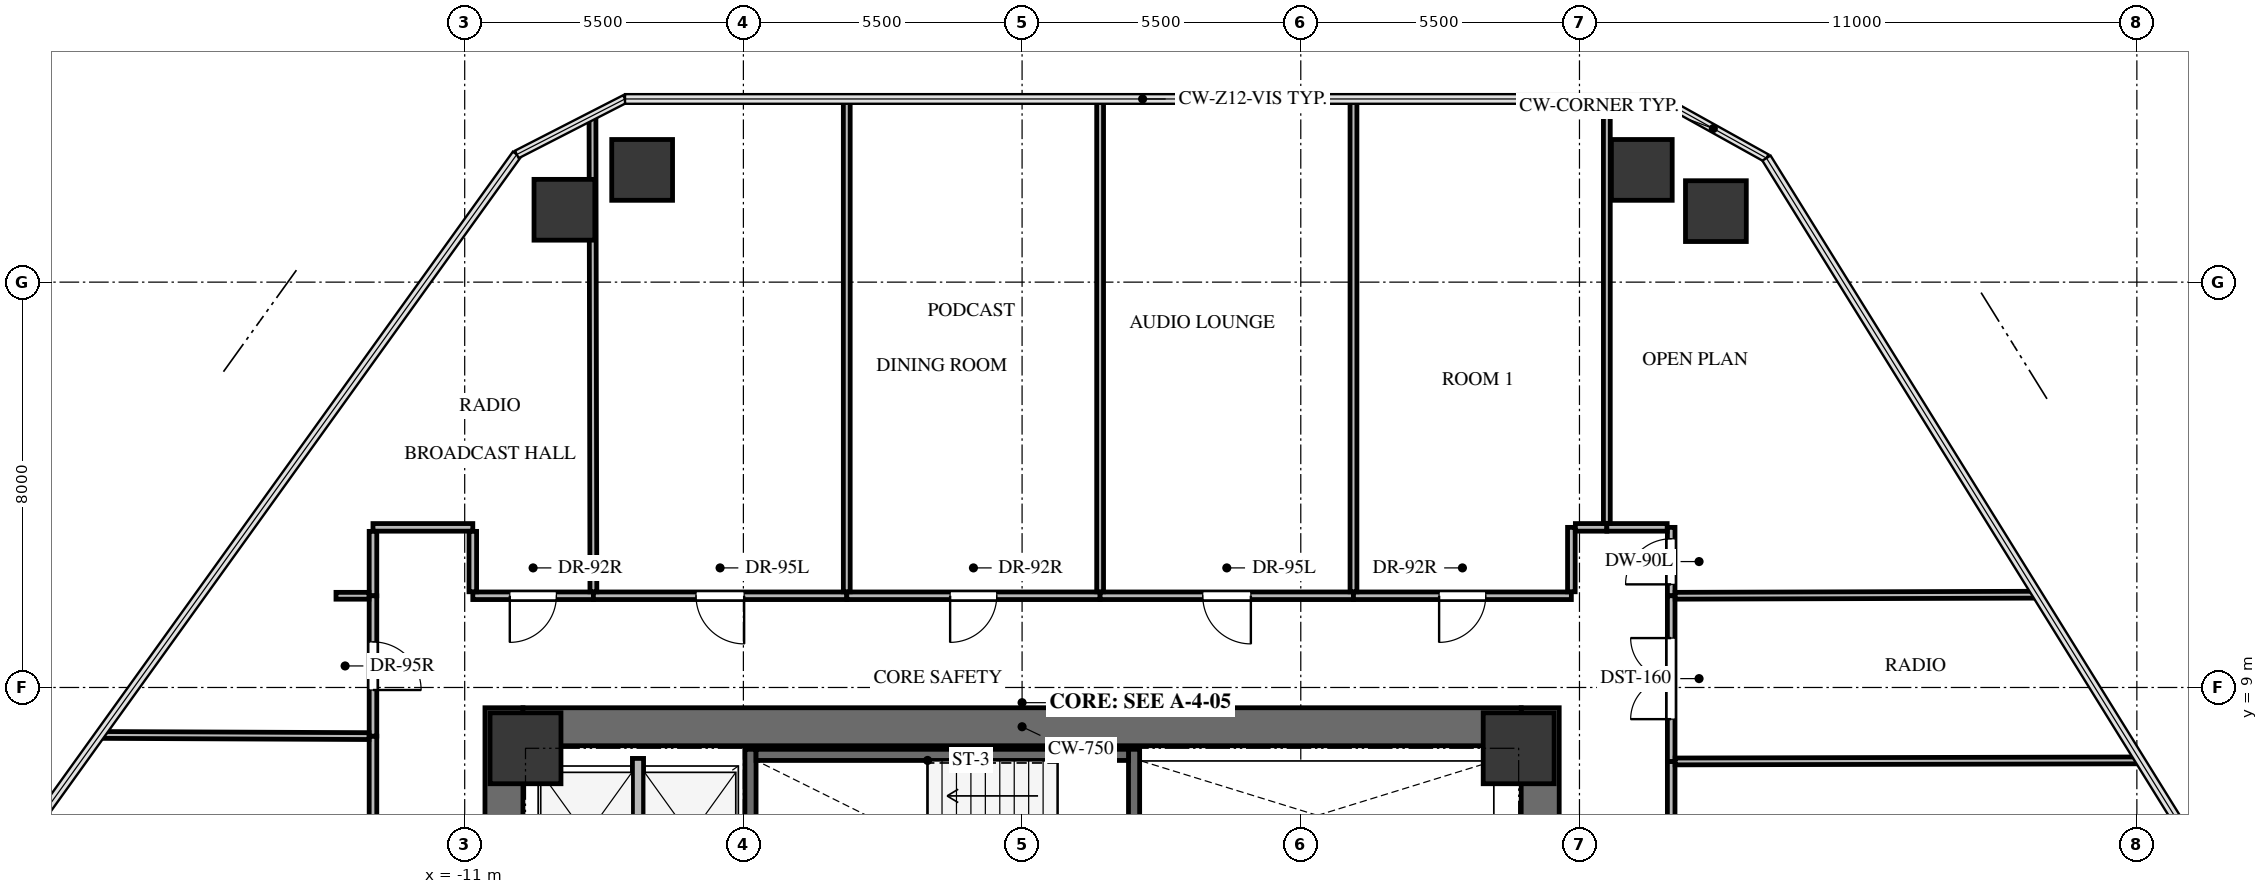
"""IFC4 building model, lengths in metres.
Left out: names, types, materials, properties, quantities, classifications, styles, units other than length and angle.
Written with IfcOpenShell. Run it as: python <this file> out.ifc"""

import sys

from ifc_helpers import new_model, si_unit, direction, frame, frame_2d, origin, origin_2d, place, context, subcontext, project, spatial, rectangle, extrude, source, transform, mapped, element, fill, save


model = new_model("IFC4")
c1 = context("Model", 3, precision=1e-05, world=origin(), true_north=direction((0.0, 1.0)))
c2 = subcontext(c1, "Body", "Model", "MODEL_VIEW")
j1 = project(units=[si_unit("LENGTHUNIT", "METRE"), si_unit("PLANEANGLEUNIT", "RADIAN")], contexts=[c1])
p1 = place(None, origin())
s1 = spatial("IfcSite", under=j1, at=p1, CompositionType="ELEMENT")
p2 = place(p1, origin())
s2 = spatial("IfcBuilding", under=s1, at=p2, CompositionType="ELEMENT")
p3 = place(p2, frame((0.0, 0.0, 123.9)))
s3 = spatial("IfcBuildingStorey", under=s2, at=p3, CompositionType="ELEMENT", Elevation=123.9)
for number, where, z_axis, x_axis in (
    (1, (-10.225, -8.6, 0.0), (0.0, 0.0, 1.0), (0.0, 1.0, 0.0)),
    (2, (10.225, -8.6, 0.0), (0.0, 0.0, 1.0), (0.0, 1.0, 0.0)),
):
    element("IfcWall", number, at=place(p3, frame(where, z_axis=z_axis, x_axis=x_axis)), inside=s3, PredefinedType="SHEAR", context=c2, shape_type="SweptSolid", body=[
        extrude(rectangle(XDim=17.2, YDim=0.75, at=frame_2d((8.6, 0.0))), origin(), (0.0, 0.0, 1.0), 3.3),
    ])
p4 = place(p3, frame((-9.85, 8.225, 0.0), z_axis=(0.0, 0.0, 1.0), x_axis=(1.0, 0.0, 0.0)))
e3 = element("IfcWall", 3, at=p4, inside=s3, PredefinedType="SHEAR", context=c2, shape_type="SweptSolid", body=[
    extrude(rectangle(XDim=19.7, YDim=0.75, at=frame_2d((9.85, 0.0))), origin(), (0.0, 0.0, 1.0), 3.3),
])
for number, where, z_axis, x_axis in (
    (4, (2.21, 4.38, -0.24), (0.0, 0.0, 1.0), (0.0, 1.0, 0.0)),
    (5, (-5.36, 7.78, -0.24), (0.0, 0.0, 1.0), (0.0, -1.0, 0.0)),
):
    element("IfcWall", number, at=place(p3, frame(where, z_axis=z_axis, x_axis=x_axis)), inside=s3, PredefinedType="SHEAR", context=c2, shape_type="SweptSolid", body=[
        extrude(rectangle(XDim=3.4, YDim=0.22, at=frame_2d((1.7, 0.0))), origin(), (0.0, 0.0, 1.0), 3.3),
    ])
p5 = place(p3, frame((2.1, 7.67, -0.24), z_axis=(0.0, 0.0, 1.0), x_axis=(-1.0, 0.0, 0.0)))
e6 = element("IfcWall", 6, at=p5, inside=s3, PredefinedType="SHEAR", context=c2, shape_type="SweptSolid", body=[
    extrude(rectangle(XDim=7.35, YDim=0.22, at=frame_2d((3.675, 0.0))), origin(), (0.0, 0.0, 1.0), 3.3),
])
m1 = source(origin(), c2, "Body", "SweptSolid", [
    extrude(rectangle(XDim=1.4, YDim=1.4, at=origin_2d()), origin(), (0.0, 0.0, 1.0), 3.3),
])
for number, where, z_axis, x_axis in (
    (7, (9.8, 7.8, -0.24), (0.0, 0.0, 1.0), (1.0, 0.0, 0.0)),
    (8, (-9.8, 7.8, -0.24), (0.0, 0.0, 1.0), (1.0, 0.0, 0.0)),
):
    element("IfcColumn", number, at=place(p3, frame(where, z_axis=z_axis, x_axis=x_axis)), inside=s3, PredefinedType="COLUMN", context=c2, shape_type="MappedRepresentation", body=[
        mapped(m1, transform((0.0, 0.0, 0.0), x_axis=(1.0, 0.0, 0.0), y_axis=(0.0, 1.0, 0.0), z_axis=(0.0, 0.0, 1.0), scale=1.0)),
    ])
m2 = source(origin(), c2, "Body", "SweptSolid", [
    extrude(rectangle(XDim=1.2, YDim=1.2, at=origin_2d()), origin(), (0.0, 0.0, 1.0), 3.3),
])
for number, where, z_axis, x_axis in (
    (9, (-9.032, 18.428, -0.24), (0.0, 0.0, 1.0), (1.0, 0.0, 0.0)),
    (10, (-7.498, 19.215, -0.24), (0.0, 0.0, 1.0), (1.0, 0.0, 0.0)),
    (11, (12.23, 19.215, -0.24), (0.0, 0.0, 1.0), (1.0, 0.0, 0.0)),
    (12, (13.692, 18.401, -0.24), (0.0, 0.0, 1.0), (1.0, 0.0, 0.0)),
):
    element("IfcColumn", number, at=place(p3, frame(where, z_axis=z_axis, x_axis=x_axis)), inside=s3, PredefinedType="COLUMN", context=c2, shape_type="MappedRepresentation", body=[
        mapped(m2, transform((0.0, 0.0, 0.0), x_axis=(1.0, 0.0, 0.0), y_axis=(0.0, 1.0, 0.0), z_axis=(0.0, 0.0, 1.0), scale=1.0)),
    ])
p6 = place(p3, frame((-7.58, 4.694, 0.0), z_axis=(0.0, 0.0, 1.0), x_axis=(0.0, 1.0, 0.0)))
e13 = element("IfcWall", 13, at=p6, inside=s3, PredefinedType="SOLIDWALL", context=c2, shape_type="SweptSolid", body=[
    extrude(rectangle(XDim=2.906, YDim=0.22, at=frame_2d((1.453, 0.0))), origin(), (0.0, 0.0, 1.0), 3.045),
])
p7 = place(p3, frame((-8.46, 10.81, 0.0), z_axis=(0.0, 0.0, 1.0), x_axis=(-1.0, 0.0, 0.0)))
e14 = element("IfcWall", 14, at=p7, inside=s3, PredefinedType="PARTITIONING", context=c2, shape_type="SweptSolid", body=[
    extrude(rectangle(XDim=2.38, YDim=0.15, at=frame_2d((1.19, 0.0))), origin(), (0.0, 0.0, 1.0), 3.045),
])
p8 = place(p7, frame((0.73, 0.0, 0.0)))
e15 = element("IfcOpeningElement", 15, at=p8, cuts=e14, PredefinedType="OPENING", context=c2, shape_type="SweptSolid", body=[
    extrude(rectangle(XDim=0.92, YDim=2.1, at=frame_2d((0.46, 1.05))), frame((0.0, 0.085, 0.0), z_axis=(0.0, -1.0, 0.0), x_axis=(1.0, 0.0, 0.0)), (0.0, 0.0, 1.0), 0.17),
])
p9 = place(p3, frame((-10.84, 12.16, 0.0), z_axis=(0.0, 0.0, 1.0), x_axis=(-1.0, 0.0, 0.0)))
e16 = element("IfcWall", 16, at=p9, inside=s3, PredefinedType="PARTITIONING", context=c2, shape_type="SweptSolid", body=[
    extrude(rectangle(XDim=1.97, YDim=0.15, at=frame_2d((0.985, 0.0))), origin(), (0.0, 0.0, 1.0), 3.045),
])
p10 = place(p3, frame((-10.84, 10.889, 0.0), z_axis=(0.0, 0.0, 1.0), x_axis=(0.0, 1.0, 0.0)))
e17 = element("IfcWall", 17, at=p10, inside=s3, PredefinedType="PARTITIONING", context=c2, shape_type="SweptSolid", body=[
    extrude(rectangle(XDim=1.192, YDim=0.15, at=frame_2d((0.596, 0.0))), origin(), (0.0, 0.0, 1.0), 3.045),
])
p11 = place(p3, frame((-12.81, 12.081, 0.0), z_axis=(0.0, 0.0, 1.0), x_axis=(0.0, -1.0, 0.0)))
e18 = element("IfcWall", 18, at=p11, inside=s3, PredefinedType="PARTITIONING", context=c2, shape_type="SweptSolid", body=[
    extrude(rectangle(XDim=1.271, YDim=0.15, at=frame_2d((0.635, 0.0))), origin(), (0.0, 0.0, 1.0), 3.045),
])
p12 = place(p3, frame((-3.46, 10.81, 0.0), z_axis=(0.0, 0.0, 1.0), x_axis=(-1.0, 0.0, 0.0)))
e19 = element("IfcWall", 19, at=p12, inside=s3, PredefinedType="PARTITIONING", context=c2, shape_type="SweptSolid", body=[
    extrude(rectangle(XDim=5.0, YDim=0.15, at=frame_2d((2.5, 0.0))), origin(), (0.0, 0.0, 1.0), 2.212),
])
p13 = place(p12, frame((2.025, 0.0, 0.0)))
e20 = element("IfcOpeningElement", 20, at=p13, cuts=e19, PredefinedType="OPENING", context=c2, shape_type="SweptSolid", body=[
    extrude(rectangle(XDim=0.95, YDim=2.1, at=frame_2d((0.475, 1.05))), frame((0.0, 0.085, 0.0), z_axis=(0.0, -1.0, 0.0), x_axis=(1.0, 0.0, 0.0)), (0.0, 0.0, 1.0), 0.17),
])
p14 = place(p3, frame((1.54, 10.81, 0.0), z_axis=(0.0, 0.0, 1.0), x_axis=(-1.0, 0.0, 0.0)))
e21 = element("IfcWall", 21, at=p14, inside=s3, PredefinedType="PARTITIONING", context=c2, shape_type="SweptSolid", body=[
    extrude(rectangle(XDim=5.0, YDim=0.15, at=frame_2d((2.5, 0.0))), origin(), (0.0, 0.0, 1.0), 3.045),
])
p15 = place(p14, frame((2.04, 0.0, 0.0)))
e22 = element("IfcOpeningElement", 22, at=p15, cuts=e21, PredefinedType="OPENING", context=c2, shape_type="SweptSolid", body=[
    extrude(rectangle(XDim=0.92, YDim=2.1, at=frame_2d((0.46, 1.05))), frame((0.0, 0.085, 0.0), z_axis=(0.0, -1.0, 0.0), x_axis=(1.0, 0.0, 0.0)), (0.0, 0.0, 1.0), 0.17),
])
p16 = place(p3, frame((6.54, 10.81, 0.0), z_axis=(0.0, 0.0, 1.0), x_axis=(-1.0, 0.0, 0.0)))
e23 = element("IfcWall", 23, at=p16, inside=s3, PredefinedType="PARTITIONING", context=c2, shape_type="SweptSolid", body=[
    extrude(rectangle(XDim=5.0, YDim=0.15, at=frame_2d((2.5, 0.0))), origin(), (0.0, 0.0, 1.0), 2.608),
])
p17 = place(p16, frame((2.025, 0.0, 0.0)))
e24 = element("IfcOpeningElement", 24, at=p17, cuts=e23, PredefinedType="OPENING", context=c2, shape_type="SweptSolid", body=[
    extrude(rectangle(XDim=0.95, YDim=2.1, at=frame_2d((0.475, 1.05))), frame((0.0, 0.085, 0.0), z_axis=(0.0, -1.0, 0.0), x_axis=(1.0, 0.0, 0.0)), (0.0, 0.0, 1.0), 0.17),
])
p18 = place(p3, frame((10.84, 10.81, 0.0), z_axis=(0.0, 0.0, 1.0), x_axis=(-1.0, 0.0, 0.0)))
e25 = element("IfcWall", 25, at=p18, inside=s3, PredefinedType="PARTITIONING", context=c2, shape_type="SweptSolid", body=[
    extrude(rectangle(XDim=4.3, YDim=0.15, at=frame_2d((2.15, 0.0))), origin(), (0.0, 0.0, 1.0), 2.212),
])
p19 = place(p18, frame((1.69, 0.0, 0.0)))
e26 = element("IfcOpeningElement", 26, at=p19, cuts=e25, PredefinedType="OPENING", context=c2, shape_type="SweptSolid", body=[
    extrude(rectangle(XDim=0.92, YDim=2.1, at=frame_2d((0.46, 1.05))), frame((0.0, 0.085, 0.0), z_axis=(0.0, -1.0, 0.0), x_axis=(1.0, 0.0, 0.0)), (0.0, 0.0, 1.0), 0.17),
])
p20 = place(p3, frame((10.84, 12.16, 0.0), z_axis=(0.0, 0.0, 1.0), x_axis=(0.0, -1.0, 0.0)))
e27 = element("IfcWall", 27, at=p20, inside=s3, PredefinedType="PARTITIONING", context=c2, shape_type="SweptSolid", body=[
    extrude(rectangle(XDim=1.271, YDim=0.15, at=frame_2d((0.635, 0.0))), origin(), (0.0, 0.0, 1.0), 2.212),
])
p21 = place(p3, frame((11.54, 12.16, 0.0), z_axis=(0.0, 0.0, 1.0), x_axis=(-1.0, 0.0, 0.0)))
e28 = element("IfcWall", 28, at=p21, inside=s3, PredefinedType="PARTITIONING", context=c2, shape_type="SweptSolid", body=[
    extrude(rectangle(XDim=0.621, YDim=0.15, at=frame_2d((0.311, 0.0))), origin(), (0.0, 0.0, 1.0), 2.212),
])
p22 = place(p3, frame((12.81, 10.81, 0.0), z_axis=(0.0, 0.0, 1.0), x_axis=(0.0, 1.0, 0.0)))
e29 = element("IfcWall", 29, at=p22, inside=s3, PredefinedType="PARTITIONING", context=c2, shape_type="SweptSolid", body=[
    extrude(rectangle(XDim=1.35, YDim=0.15, at=frame_2d((0.675, 0.0))), origin(), (0.0, 0.0, 1.0), 3.045),
])
p23 = place(p22, frame((0.225, 0.0, 0.0)))
e30 = element("IfcOpeningElement", 30, at=p23, cuts=e29, PredefinedType="OPENING", context=c2, shape_type="SweptSolid", body=[
    extrude(rectangle(XDim=0.9, YDim=2.05, at=frame_2d((0.45, 1.025))), frame((0.0, 0.085, 0.0), z_axis=(0.0, -1.0, 0.0), x_axis=(1.0, 0.0, 0.0)), (0.0, 0.0, 1.0), 0.17),
])
p24 = place(p3, frame((12.731, 12.16, 0.0), z_axis=(0.0, 0.0, 1.0), x_axis=(-1.0, 0.0, 0.0)))
e31 = element("IfcWall", 31, at=p24, inside=s3, PredefinedType="PARTITIONING", context=c2, shape_type="SweptSolid", body=[
    extrude(rectangle(XDim=1.191, YDim=0.15, at=frame_2d((0.595, 0.0))), origin(), (0.0, 0.0, 1.0), 2.212),
])
p25 = place(p3, frame((-12.81, 8.04, 0.0), z_axis=(0.0, 0.0, 1.0), x_axis=(0.0, -1.0, 0.0)))
e32 = element("IfcWall", 32, at=p25, inside=s3, PredefinedType="PARTITIONING", context=c2, shape_type="SweptSolid", body=[
    extrude(rectangle(XDim=4.5, YDim=0.15, at=frame_2d((2.25, 0.0))), origin(), (0.0, 0.0, 1.0), 3.045),
])
p26 = place(p25, frame((1.79, 0.0, 0.0)))
e33 = element("IfcOpeningElement", 33, at=p26, cuts=e32, PredefinedType="OPENING", context=c2, shape_type="SweptSolid", body=[
    extrude(rectangle(XDim=0.92, YDim=2.1, at=frame_2d((0.46, 1.05))), frame((0.0, 0.085, 0.0), z_axis=(0.0, -1.0, 0.0), x_axis=(1.0, 0.0, 0.0)), (0.0, 0.0, 1.0), 0.17),
])
p27 = place(p3, frame((-12.81, 10.81, 0.0), z_axis=(0.0, 0.0, 1.0), x_axis=(0.0, -1.0, 0.0)))
e34 = element("IfcWall", 34, at=p27, inside=s3, PredefinedType="PARTITIONING", context=c2, shape_type="SweptSolid", body=[
    extrude(rectangle(XDim=2.77, YDim=0.15, at=frame_2d((1.385, 0.0))), origin(), (0.0, 0.0, 1.0), 3.045),
])
p28 = place(p27, frame((0.91, 0.0, 0.0)))
e35 = element("IfcOpeningElement", 35, at=p28, cuts=e34, PredefinedType="OPENING", context=c2, shape_type="SweptSolid", body=[
    extrude(rectangle(XDim=0.95, YDim=2.1, at=frame_2d((0.475, 1.05))), frame((0.0, 0.085, 0.0), z_axis=(0.0, -1.0, 0.0), x_axis=(1.0, 0.0, 0.0)), (0.0, 0.0, 1.0), 0.17),
])
p29 = place(p3, frame((12.81, 3.54, 0.0), z_axis=(0.0, 0.0, 1.0), x_axis=(0.0, 1.0, 0.0)))
e36 = element("IfcWall", 36, at=p29, inside=s3, PredefinedType="PARTITIONING", context=c2, shape_type="SweptSolid", body=[
    extrude(rectangle(XDim=4.0, YDim=0.15, at=frame_2d((2.0, 0.0))), origin(), (0.0, 0.0, 1.0), 3.045),
])
p30 = place(p29, frame((1.55, 0.0, 0.0)))
e37 = element("IfcOpeningElement", 37, at=p30, cuts=e36, PredefinedType="OPENING", context=c2, shape_type="SweptSolid", body=[
    extrude(rectangle(XDim=0.9, YDim=2.05, at=frame_2d((0.45, 1.025))), frame((0.0, 0.085, 0.0), z_axis=(0.0, -1.0, 0.0), x_axis=(1.0, 0.0, 0.0)), (0.0, 0.0, 1.0), 0.17),
])
p31 = place(p3, frame((12.81, 7.54, 0.0), z_axis=(0.0, 0.0, 1.0), x_axis=(0.0, 1.0, 0.0)))
e38 = element("IfcWall", 38, at=p31, inside=s3, PredefinedType="PARTITIONING", context=c2, shape_type="SweptSolid", body=[
    extrude(rectangle(XDim=3.27, YDim=0.15, at=frame_2d((1.635, 0.0))), origin(), (0.0, 0.0, 1.0), 3.045),
])
p32 = place(p31, frame((0.835, 0.0, 0.0)))
e39 = element("IfcOpeningElement", 39, at=p32, cuts=e38, PredefinedType="OPENING", context=c2, shape_type="SweptSolid", body=[
    extrude(rectangle(XDim=1.6, YDim=2.15, at=frame_2d((0.8, 1.075))), frame((0.0, 0.085, 0.0), z_axis=(0.0, -1.0, 0.0), x_axis=(1.0, 0.0, 0.0)), (0.0, 0.0, 1.0), 0.17),
])
p33 = place(p3, frame((-8.478, 20.286, 0.0), z_axis=(0.0, 0.0, 1.0), x_axis=(0.001922623691, -0.999998151757, 0.0)))
e40 = element("IfcWall", 40, at=p33, inside=s3, PredefinedType="PARTITIONING", context=c2, shape_type="SweptSolid", body=[
    extrude(rectangle(XDim=9.397, YDim=0.135, at=frame_2d((4.698, 0.0))), origin(), (0.0, 0.0, 1.0), 2.212),
])
p34 = place(p3, frame((-12.889, 10.81, 0.0), z_axis=(0.0, 0.0, 1.0), x_axis=(-1.0, 0.0, 0.0)))
e41 = element("IfcWall", 41, at=p34, inside=s3, PredefinedType="PARTITIONING", context=c2, shape_type="SweptSolid", body=[
    extrude(rectangle(XDim=0.651, YDim=0.135, at=frame_2d((0.326, 0.0))), origin(), (0.0, 0.0, 1.0), 3.045),
])
for number, where, z_axis, x_axis in (
    (42, (-3.46, 20.615, 0.0), (0.0, 0.0, 1.0), (0.0, -1.0, 0.0)),
    (43, (1.54, 20.615, 0.0), (0.0, 0.0, 1.0), (0.0, -1.0, 0.0)),
    (44, (6.54, 20.615, 0.0), (0.0, 0.0, 1.0), (0.0, -1.0, 0.0)),
):
    element("IfcWall", number, at=place(p3, frame(where, z_axis=z_axis, x_axis=x_axis)), inside=s3, PredefinedType="PARTITIONING", context=c2, shape_type="SweptSolid", body=[
        extrude(rectangle(XDim=9.726, YDim=0.135, at=frame_2d((4.863, 0.0))), origin(), (0.0, 0.0, 1.0), 2.38),
    ])
p35 = place(p3, frame((11.54, 20.615, 0.0), z_axis=(0.0, 0.0, 1.0), x_axis=(0.0, -1.0, 0.0)))
e45 = element("IfcWall", 45, at=p35, inside=s3, PredefinedType="PARTITIONING", context=c2, shape_type="SweptSolid", body=[
    extrude(rectangle(XDim=8.376, YDim=0.135, at=frame_2d((4.188, 0.0))), origin(), (0.0, 0.0, 1.0), 2.212),
])
p36 = place(p3, frame((20.035, 10.831, 0.0), z_axis=(0.0, 0.0, 1.0), x_axis=(-0.999995783715, -0.002903885812, 0.0)))
e46 = element("IfcWall", 46, at=p36, inside=s3, PredefinedType="PARTITIONING", context=c2, shape_type="SweptSolid", body=[
    extrude(rectangle(XDim=7.146, YDim=0.135, at=frame_2d((3.573, 0.0))), origin(), (0.0, 0.0, 1.0), 2.38),
])
p37 = place(p3, frame((-18.202, 8.063, 0.0), z_axis=(0.0, 0.0, 1.0), x_axis=(0.999990671281, -0.004319415637, 0.0)))
e47 = element("IfcWall", 47, at=p37, inside=s3, PredefinedType="PARTITIONING", context=c2, shape_type="SweptSolid", body=[
    extrude(rectangle(XDim=5.313, YDim=0.135, at=frame_2d((2.656, 0.0))), origin(), (0.0, 0.0, 1.0), 2.38),
])
p38 = place(p3, frame((12.889, 7.54, 0.0), z_axis=(0.0, 0.0, 1.0), x_axis=(0.99999744191, 0.002261895808, 0.0)))
e48 = element("IfcWall", 48, at=p38, inside=s3, PredefinedType="PARTITIONING", context=c2, shape_type="SweptSolid", body=[
    extrude(rectangle(XDim=9.175, YDim=0.135, at=frame_2d((4.587, 0.0))), origin(), (0.0, 0.0, 1.0), 2.38),
])
m3 = source(origin(), c2, "Body", "SweptSolid", [
    extrude(rectangle(XDim=0.92, YDim=2.1, at=frame_2d((0.46, 1.05))), frame((0.0, 0.025, 0.0), z_axis=(0.0, -1.0, 0.0), x_axis=(1.0, 0.0, 0.0)), (0.0, 0.0, 1.0), 0.05),
])
p39 = place(p8, origin())
e49 = element("IfcDoor", 49, at=p39, inside=s3, OperationType="SINGLE_SWING_RIGHT", PredefinedType="DOOR", context=c2, shape_type="MappedRepresentation", body=[
    mapped(m3, transform((0.0, 0.0, 0.0), x_axis=(1.0, 0.0, 0.0), y_axis=(0.0, 1.0, 0.0), z_axis=(0.0, 0.0, 1.0), scale=1.0)),
])
fill(e15, e49)
m4 = source(origin(), c2, "Body", "SweptSolid", [
    extrude(rectangle(XDim=0.95, YDim=2.1, at=frame_2d((0.475, 1.05))), frame((0.0, 0.025, 0.0), z_axis=(0.0, -1.0, 0.0), x_axis=(1.0, 0.0, 0.0)), (0.0, 0.0, 1.0), 0.05),
])
p40 = place(p13, origin())
e50 = element("IfcDoor", 50, at=p40, inside=s3, OperationType="SINGLE_SWING_LEFT", PredefinedType="DOOR", context=c2, shape_type="MappedRepresentation", body=[
    mapped(m4, transform((0.0, 0.0, 0.0), x_axis=(1.0, 0.0, 0.0), y_axis=(0.0, 1.0, 0.0), z_axis=(0.0, 0.0, 1.0), scale=1.0)),
])
fill(e20, e50)
p41 = place(p15, origin())
e51 = element("IfcDoor", 51, at=p41, inside=s3, OperationType="SINGLE_SWING_RIGHT", PredefinedType="DOOR", context=c2, shape_type="MappedRepresentation", body=[
    mapped(m3, transform((0.0, 0.0, 0.0), x_axis=(1.0, 0.0, 0.0), y_axis=(0.0, 1.0, 0.0), z_axis=(0.0, 0.0, 1.0), scale=1.0)),
])
fill(e22, e51)
p42 = place(p17, origin())
e52 = element("IfcDoor", 52, at=p42, inside=s3, OperationType="SINGLE_SWING_LEFT", PredefinedType="DOOR", context=c2, shape_type="MappedRepresentation", body=[
    mapped(m4, transform((0.0, 0.0, 0.0), x_axis=(1.0, 0.0, 0.0), y_axis=(0.0, 1.0, 0.0), z_axis=(0.0, 0.0, 1.0), scale=1.0)),
])
fill(e24, e52)
p43 = place(p19, origin())
e53 = element("IfcDoor", 53, at=p43, inside=s3, OperationType="SINGLE_SWING_RIGHT", PredefinedType="DOOR", context=c2, shape_type="MappedRepresentation", body=[
    mapped(m3, transform((0.0, 0.0, 0.0), x_axis=(1.0, 0.0, 0.0), y_axis=(0.0, 1.0, 0.0), z_axis=(0.0, 0.0, 1.0), scale=1.0)),
])
fill(e26, e53)
m5 = source(origin(), c2, "Body", "SweptSolid", [
    extrude(rectangle(XDim=0.9, YDim=2.05, at=frame_2d((0.45, 1.025))), frame((0.0, 0.025, 0.0), z_axis=(0.0, -1.0, 0.0), x_axis=(1.0, 0.0, 0.0)), (0.0, 0.0, 1.0), 0.05),
])
p44 = place(p23, origin())
e54 = element("IfcDoor", 54, at=p44, inside=s3, OperationType="SINGLE_SWING_LEFT", PredefinedType="DOOR", context=c2, shape_type="MappedRepresentation", body=[
    mapped(m5, transform((0.0, 0.0, 0.0), x_axis=(1.0, 0.0, 0.0), y_axis=(0.0, 1.0, 0.0), z_axis=(0.0, 0.0, 1.0), scale=1.0)),
])
fill(e30, e54)
m6 = source(origin(), c2, "Body", "SweptSolid", [
    extrude(rectangle(XDim=0.95, YDim=2.1, at=frame_2d((0.475, 1.05))), frame((0.0, 0.025, 0.0), z_axis=(0.0, -1.0, 0.0), x_axis=(1.0, 0.0, 0.0)), (0.0, 0.0, 1.0), 0.05),
])
p45 = place(p28, origin())
e55 = element("IfcDoor", 55, at=p45, inside=s3, OperationType="SINGLE_SWING_RIGHT", PredefinedType="DOOR", context=c2, shape_type="MappedRepresentation", body=[
    mapped(m6, transform((0.0, 0.0, 0.0), x_axis=(1.0, 0.0, 0.0), y_axis=(0.0, 1.0, 0.0), z_axis=(0.0, 0.0, 1.0), scale=1.0)),
])
fill(e35, e55)
m7 = source(origin(), c2, "Body", "SweptSolid", [
    extrude(rectangle(XDim=1.6, YDim=2.15, at=frame_2d((0.8, 1.075))), frame((0.0, 0.025, 0.0), z_axis=(0.0, -1.0, 0.0), x_axis=(1.0, 0.0, 0.0)), (0.0, 0.0, 1.0), 0.05),
])
p46 = place(p32, origin())
e56 = element("IfcDoor", 56, at=p46, inside=s3, OperationType="DOUBLE_DOOR_SINGLE_SWING", PredefinedType="DOOR", context=c2, shape_type="MappedRepresentation", body=[
    mapped(m7, transform((0.0, 0.0, 0.0), x_axis=(1.0, 0.0, 0.0), y_axis=(0.0, 1.0, 0.0), z_axis=(0.0, 0.0, 1.0), scale=1.0)),
])
fill(e39, e56)
save(model, sys.argv[1])
